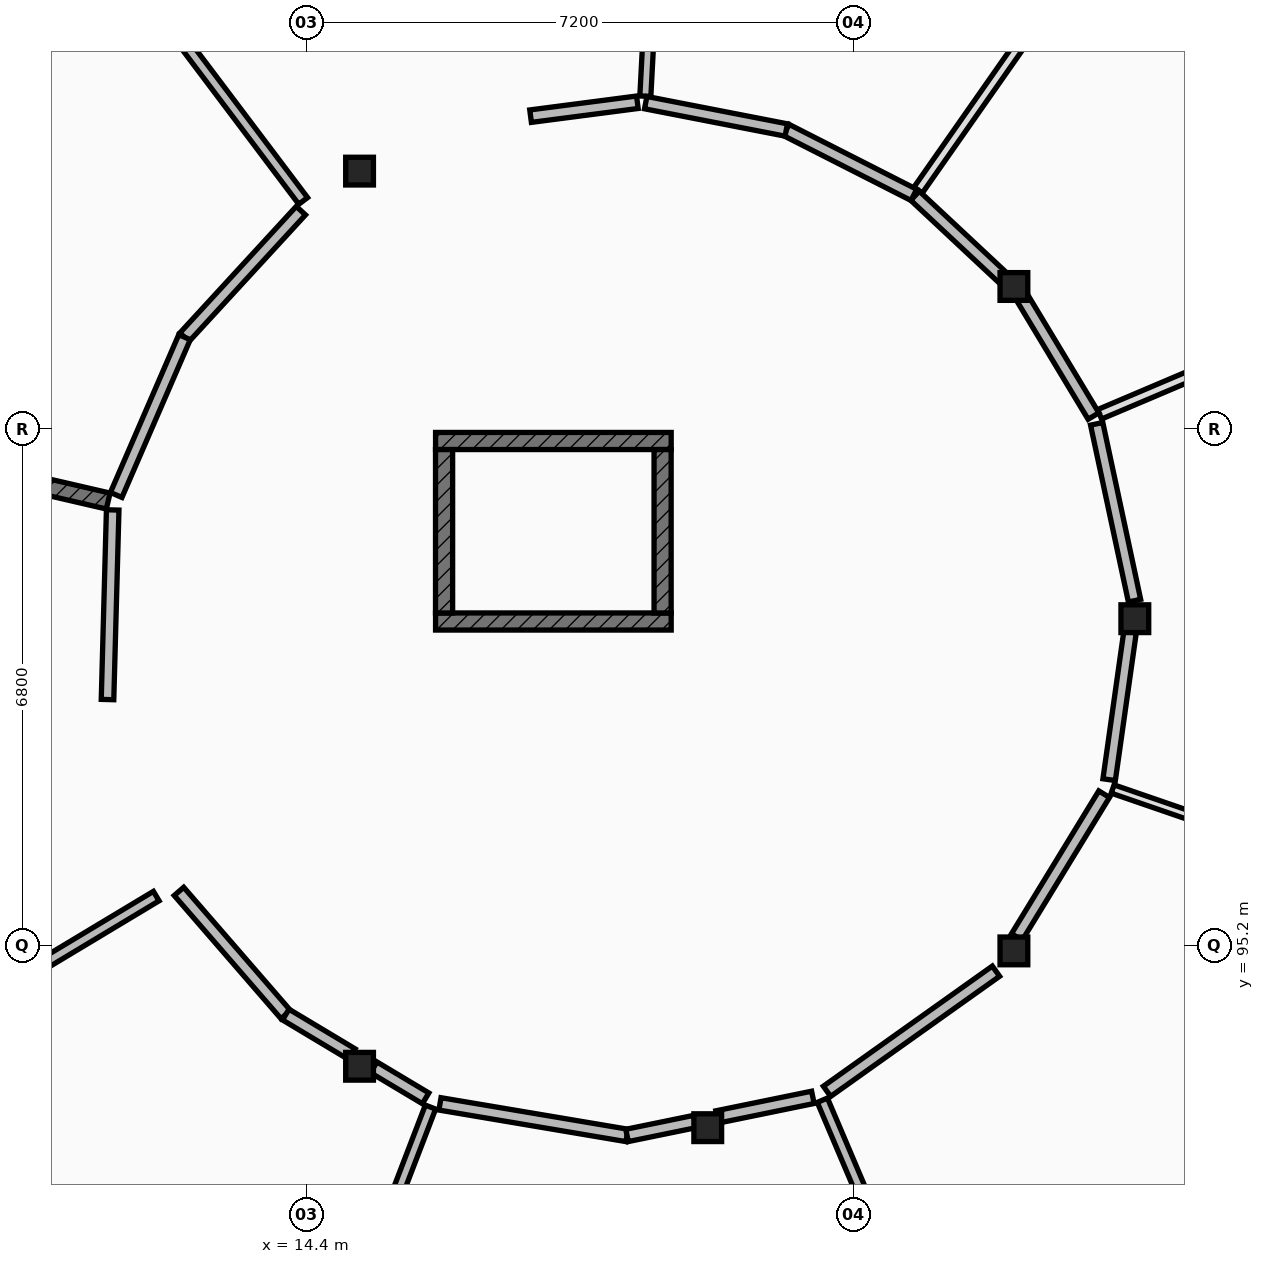
"""IFC4 building model, lengths in metres.
Left out: names, types, materials, properties, quantities, classifications, styles, units other than length and angle.
Written with IfcOpenShell. Run it as: python <this file> out.ifc"""

import sys

from ifc_helpers import new_model, si_unit, direction, frame, frame_2d, origin, origin_2d, place, context, subcontext, project, spatial, rectangle, extrude, element, fill, save


model = new_model("IFC4")
c1 = context("Model", 3, precision=1e-05, world=origin(), true_north=direction((0.0, 1.0)))
c2 = subcontext(c1, "Body", "Model", "MODEL_VIEW")
j1 = project(units=[si_unit("LENGTHUNIT", "METRE"), si_unit("PLANEANGLEUNIT", "RADIAN")], contexts=[c1])
p1 = place(None, origin())
s1 = spatial("IfcSite", under=j1, at=p1, CompositionType="ELEMENT")
p2 = place(p1, origin())
s2 = spatial("IfcBuilding", under=s1, at=p2, CompositionType="ELEMENT")
p3 = place(p2, frame((0.0, 0.0, 8.75)))
s3 = spatial("IfcBuildingStorey", under=s2, at=p3, CompositionType="ELEMENT", Elevation=8.75)
for number, where, z_axis, x_axis in (
    (1, (25.3, 99.5, 0.0), (0.0, 0.0, 1.0), (1.0, 0.0, 0.0)),
    (2, (23.709, 103.871, 0.0), (0.0, 0.0, 1.0), (1.0, 0.0, 0.0)),
    (3, (15.1, 105.389, 0.0), (0.0, 0.0, 1.0), (1.0, 0.0, 0.0)),
    (4, (15.1, 93.611, 0.0), (0.0, 0.0, 1.0), (1.0, 0.0, 0.0)),
    (5, (19.681, 92.803, 0.0), (0.0, 0.0, 1.0), (1.0, 0.0, 0.0)),
    (6, (23.709, 95.129, 0.0), (0.0, 0.0, 1.0), (1.0, 0.0, 0.0)),
):
    element("IfcColumn", number, at=place(p3, frame(where, z_axis=z_axis, x_axis=x_axis)), inside=s3, PredefinedType="COLUMN", context=c2, shape_type="SweptSolid", body=[
        extrude(rectangle(XDim=0.365, YDim=0.365, at=origin_2d()), origin(), (0.0, 0.0, 1.0), 4.2),
    ])
p4 = place(p3, frame((16.1, 99.463, 0.0), z_axis=(0.0, 0.0, 1.0), x_axis=(1.0, 0.0, 0.0)))
e7 = element("IfcWall", 7, at=p4, inside=s3, PredefinedType="SHEAR", context=c2, shape_type="SweptSolid", body=[
    extrude(rectangle(XDim=3.1, YDim=0.225, at=frame_2d((1.55, 0.0))), origin(), (0.0, 0.0, 1.0), 3.975),
])
p5 = place(p4, frame((0.95, 0.0, 0.0)))
e8 = element("IfcOpeningElement", 8, at=p5, cuts=e7, PredefinedType="OPENING", context=c2, shape_type="SweptSolid", body=[
    extrude(rectangle(XDim=1.2, YDim=2.2, at=frame_2d((0.6, 1.1))), frame((0.0, 0.123, 0.0), z_axis=(0.0, -1.0, 0.0), x_axis=(1.0, 0.0, 0.0)), (0.0, 0.0, 1.0), 0.245),
])
p6 = place(p3, frame((16.1, 101.838, 0.0), z_axis=(0.0, 0.0, 1.0), x_axis=(1.0, 0.0, 0.0)))
e9 = element("IfcWall", 9, at=p6, inside=s3, PredefinedType="SHEAR", context=c2, shape_type="SweptSolid", body=[
    extrude(rectangle(XDim=3.1, YDim=0.225, at=frame_2d((1.55, 0.0))), origin(), (0.0, 0.0, 1.0), 3.975),
])
for number, where, z_axis, x_axis in (
    (10, (16.212, 99.575, 0.0), (0.0, 0.0, 1.0), (0.0, 1.0, 0.0)),
    (11, (19.087, 99.575, 0.0), (0.0, 0.0, 1.0), (0.0, 1.0, 0.0)),
):
    element("IfcWall", number, at=place(p3, frame(where, z_axis=z_axis, x_axis=x_axis)), inside=s3, PredefinedType="SHEAR", context=c2, shape_type="SweptSolid", body=[
        extrude(rectangle(XDim=2.15, YDim=0.225, at=frame_2d((1.075, 0.0))), origin(), (0.0, 0.0, 1.0), 3.975),
    ])
p7 = place(p3, frame((18.86, 106.374, 0.0), z_axis=(0.0, 0.0, 1.0), x_axis=(0.052244629109, 0.998634316819, 0.0)))
e12 = element("IfcWall", 12, at=p7, inside=s3, PredefinedType="PARTITIONING", context=c2, shape_type="SweptSolid", body=[
    extrude(rectangle(XDim=0.897, YDim=0.145, at=frame_2d((0.449, 0.0))), origin(), (0.0, 0.0, 1.0), 3.304),
])
p8 = place(p3, frame((14.358, 104.997, 0.0), z_axis=(0.0, 0.0, 1.0), x_axis=(-0.601846782462, 0.798611576701, 0.0)))
e13 = element("IfcWall", 13, at=p8, inside=s3, PredefinedType="PARTITIONING", context=c2, shape_type="SweptSolid", body=[
    extrude(rectangle(XDim=5.875, YDim=0.145, at=frame_2d((2.938, 0.0))), origin(), (0.0, 0.0, 1.0), 3.304),
])
p9 = place(p3, frame((11.793, 101.048, 0.0), z_axis=(0.0, 0.0, 1.0), x_axis=(-0.974281711151, 0.225333413672, 0.0)))
e14 = element("IfcWall", 14, at=p9, inside=s3, PredefinedType="SOLIDWALL", context=c2, shape_type="SweptSolid", body=[
    extrude(rectangle(XDim=1.091, YDim=0.215, at=frame_2d((0.545, 0.0))), origin(), (0.0, 0.0, 1.0), 3.304),
])
p10 = place(p3, frame((12.425, 95.85, 0.0), z_axis=(0.0, 0.0, 1.0), x_axis=(-0.857148493381, -0.515069374255, 0.0)))
e15 = element("IfcWall", 15, at=p10, inside=s3, PredefinedType="PARTITIONING", context=c2, shape_type="SweptSolid", body=[
    extrude(rectangle(XDim=5.695, YDim=0.145, at=frame_2d((2.847, 0.0))), origin(), (0.0, 0.0, 1.0), 3.304),
])
p11 = place(p3, frame((16.033, 93.074, 0.0), z_axis=(0.0, 0.0, 1.0), x_axis=(-0.35829933208, -0.933606763381, 0.0)))
e16 = element("IfcWall", 16, at=p11, inside=s3, PredefinedType="PARTITIONING", context=c2, shape_type="SweptSolid", body=[
    extrude(rectangle(XDim=5.897, YDim=0.145, at=frame_2d((2.949, 0.0))), origin(), (0.0, 0.0, 1.0), 3.304),
])
p12 = place(p3, frame((21.189, 93.164, 0.0), z_axis=(0.0, 0.0, 1.0), x_axis=(0.390817685438, -0.920468107404, 0.0)))
e17 = element("IfcWall", 17, at=p12, inside=s3, PredefinedType="PARTITIONING", context=c2, shape_type="SweptSolid", body=[
    extrude(rectangle(XDim=5.875, YDim=0.145, at=frame_2d((2.938, 0.0))), origin(), (0.0, 0.0, 1.0), 3.304),
])
p13 = place(p3, frame((25.008, 97.259, 0.0), z_axis=(0.0, 0.0, 1.0), x_axis=(0.945537377012, -0.325513546068, 0.0)))
e18 = element("IfcWall", 18, at=p13, inside=s3, PredefinedType="PARTITIONING", context=c2, shape_type="SweptSolid", body=[
    extrude(rectangle(XDim=5.898, YDim=0.115, at=frame_2d((2.949, 0.0))), origin(), (0.0, 0.0, 1.0), 3.304),
])
p14 = place(p3, frame((24.836, 102.189, 0.0), z_axis=(0.0, 0.0, 1.0), x_axis=(0.920468107404, 0.390817685438, 0.0)))
e19 = element("IfcWall", 19, at=p14, inside=s3, PredefinedType="PLUMBINGWALL", context=c2, shape_type="SweptSolid", body=[
    extrude(rectangle(XDim=5.875, YDim=0.135, at=frame_2d((2.938, 0.0))), origin(), (0.0, 0.0, 1.0), 3.304),
])
p15 = place(p3, frame((22.448, 105.138, 0.0), z_axis=(0.0, 0.0, 1.0), x_axis=(0.573462344363, 0.819231920519, 0.0)))
e20 = element("IfcWall", 20, at=p15, inside=s3, PredefinedType="PLUMBINGWALL", context=c2, shape_type="SweptSolid", body=[
    extrude(rectangle(XDim=5.868, YDim=0.135, at=frame_2d((2.934, 0.0))), origin(), (0.0, 0.0, 1.0), 3.304),
])
p16 = place(p3, frame((18.755, 106.295, 0.0), z_axis=(0.0, 0.0, 1.0), x_axis=(-0.991634012436, -0.129081313054, 0.0)))
e21 = element("IfcWall", 21, at=p16, inside=s3, PredefinedType="PARTITIONING", context=c2, shape_type="SweptSolid", body=[
    extrude(rectangle(XDim=1.417, YDim=0.165, at=frame_2d((0.708, 0.0))), origin(), (0.0, 0.0, 1.0), 3.304),
])
p17 = place(p16, frame((0.258, 0.0, 0.0)))
e22 = element("IfcOpeningElement", 22, at=p17, cuts=e21, PredefinedType="OPENING", context=c2, shape_type="SweptSolid", body=[
    extrude(rectangle(XDim=0.9, YDim=2.1, at=frame_2d((0.45, 1.05))), frame((0.0, 0.093, 0.0), z_axis=(0.0, -1.0, 0.0), x_axis=(1.0, 0.0, 0.0)), (0.0, 0.0, 1.0), 0.185),
])
p18 = place(p3, frame((14.328, 104.869, 0.0), z_axis=(0.0, 0.0, 1.0), x_axis=(-0.676853044356, -0.736118167379, 0.0)))
e23 = element("IfcWall", 23, at=p18, inside=s3, PredefinedType="PARTITIONING", context=c2, shape_type="SweptSolid", body=[
    extrude(rectangle(XDim=2.261, YDim=0.165, at=frame_2d((1.131, 0.0))), origin(), (0.0, 0.0, 1.0), 3.304),
])
p19 = place(p18, frame((0.566, 0.0, 0.0)))
e24 = element("IfcOpeningElement", 24, at=p19, cuts=e23, PredefinedType="OPENING", context=c2, shape_type="SweptSolid", body=[
    extrude(rectangle(XDim=1.13, YDim=2.14, at=frame_2d((0.565, 1.07))), frame((0.0, 0.093, 0.0), z_axis=(0.0, -1.0, 0.0), x_axis=(1.0, 0.0, 0.0)), (0.0, 0.0, 1.0), 0.185),
])
p20 = place(p3, frame((12.797, 103.204, 0.0), z_axis=(0.0, 0.0, 1.0), x_axis=(-0.397419678039, -0.917636964985, 0.0)))
e25 = element("IfcWall", 25, at=p20, inside=s3, PredefinedType="PARTITIONING", context=c2, shape_type="SweptSolid", body=[
    extrude(rectangle(XDim=2.262, YDim=0.165, at=frame_2d((1.131, 0.0))), origin(), (0.0, 0.0, 1.0), 3.304),
])
p21 = place(p3, frame((11.852, 100.931, 0.0), z_axis=(0.0, 0.0, 1.0), x_axis=(-0.027291914499, -0.999627506326, 0.0)))
e26 = element("IfcWall", 26, at=p21, inside=s3, PredefinedType="PARTITIONING", context=c2, shape_type="SweptSolid", body=[
    extrude(rectangle(XDim=2.496, YDim=0.165, at=frame_2d((1.248, 0.0))), origin(), (0.0, 0.0, 1.0), 3.304),
])
p22 = place(p21, frame((0.523, 0.0, 0.0)))
e27 = element("IfcOpeningElement", 27, at=p22, cuts=e26, PredefinedType="OPENING", context=c2, shape_type="SweptSolid", body=[
    extrude(rectangle(XDim=1.45, YDim=2.28, at=frame_2d((0.725, 1.14))), frame((0.0, 0.093, 0.0), z_axis=(0.0, -1.0, 0.0), x_axis=(1.0, 0.0, 0.0)), (0.0, 0.0, 1.0), 0.185),
])
p23 = place(p3, frame((12.724, 95.912, 0.0), z_axis=(0.0, 0.0, 1.0), x_axis=(0.654887207042, -0.755726634473, 0.0)))
e28 = element("IfcWall", 28, at=p23, inside=s3, PredefinedType="PARTITIONING", context=c2, shape_type="SweptSolid", body=[
    extrude(rectangle(XDim=2.145, YDim=0.165, at=frame_2d((1.073, 0.0))), origin(), (0.0, 0.0, 1.0), 3.304),
])
p24 = place(p23, frame((0.488, 0.0, 0.0)))
e29 = element("IfcOpeningElement", 29, at=p24, cuts=e28, PredefinedType="OPENING", context=c2, shape_type="SweptSolid", body=[
    extrude(rectangle(XDim=1.17, YDim=2.24, at=frame_2d((0.585, 1.12))), frame((0.0, 0.093, 0.0), z_axis=(0.0, -1.0, 0.0), x_axis=(1.0, 0.0, 0.0)), (0.0, 0.0, 1.0), 0.185),
])
p25 = place(p3, frame((14.129, 94.291, 0.0), z_axis=(0.0, 0.0, 1.0), x_axis=(0.857789762301, -0.51400070398, 0.0)))
e30 = element("IfcWall", 30, at=p25, inside=s3, PredefinedType="PARTITIONING", context=c2, shape_type="SweptSolid", body=[
    extrude(rectangle(XDim=1.016, YDim=0.165, at=frame_2d((0.508, 0.0))), origin(), (0.0, 0.0, 1.0), 3.304),
])
p26 = place(p3, frame((15.287, 93.597, 0.0), z_axis=(0.0, 0.0, 1.0), x_axis=(0.858142882263, -0.513410940301, 0.0)))
e31 = element("IfcWall", 31, at=p26, inside=s3, PredefinedType="PARTITIONING", context=c2, shape_type="SweptSolid", body=[
    extrude(rectangle(XDim=0.795, YDim=0.165, at=frame_2d((0.397, 0.0))), origin(), (0.0, 0.0, 1.0), 3.304),
])
p27 = place(p3, frame((16.158, 93.116, 0.0), z_axis=(0.0, 0.0, 1.0), x_axis=(0.986074817065, -0.166302300497, 0.0)))
e32 = element("IfcWall", 32, at=p27, inside=s3, PredefinedType="PARTITIONING", context=c2, shape_type="SweptSolid", body=[
    extrude(rectangle(XDim=2.496, YDim=0.165, at=frame_2d((1.248, 0.0))), origin(), (0.0, 0.0, 1.0), 3.304),
])
p28 = place(p27, frame((0.653, 0.0, 0.0)))
e33 = element("IfcOpeningElement", 33, at=p28, cuts=e32, PredefinedType="OPENING", context=c2, shape_type="SweptSolid", body=[
    extrude(rectangle(XDim=1.19, YDim=2.26, at=frame_2d((0.595, 1.13))), frame((0.0, 0.093, 0.0), z_axis=(0.0, -1.0, 0.0), x_axis=(1.0, 0.0, 0.0)), (0.0, 0.0, 1.0), 0.185),
])
p29 = place(p3, frame((18.619, 92.701, 0.0), z_axis=(0.0, 0.0, 1.0), x_axis=(0.979621619883, 0.200851890353, 0.0)))
e34 = element("IfcWall", 34, at=p29, inside=s3, PredefinedType="PARTITIONING", context=c2, shape_type="SweptSolid", body=[
    extrude(rectangle(XDim=0.912, YDim=0.165, at=frame_2d((0.456, 0.0))), origin(), (0.0, 0.0, 1.0), 3.304),
])
p30 = place(p3, frame((19.804, 92.944, 0.0), z_axis=(0.0, 0.0, 1.0), x_axis=(0.97970222492, 0.200458351001, 0.0)))
e35 = element("IfcWall", 35, at=p30, inside=s3, PredefinedType="PARTITIONING", context=c2, shape_type="SweptSolid", body=[
    extrude(rectangle(XDim=1.286, YDim=0.165, at=frame_2d((0.643, 0.0))), origin(), (0.0, 0.0, 1.0), 3.304),
])
p31 = place(p3, frame((21.25, 93.281, 0.0), z_axis=(0.0, 0.0, 1.0), x_axis=(0.814898961152, 0.579603039255, 0.0)))
e36 = element("IfcWall", 36, at=p31, inside=s3, PredefinedType="PARTITIONING", context=c2, shape_type="SweptSolid", body=[
    extrude(rectangle(XDim=2.728, YDim=0.165, at=frame_2d((1.364, 0.0))), origin(), (0.0, 0.0, 1.0), 3.304),
])
p32 = place(p31, frame((0.759, 0.0, 0.0)))
e37 = element("IfcOpeningElement", 37, at=p32, cuts=e36, PredefinedType="OPENING", context=c2, shape_type="SweptSolid", body=[
    extrude(rectangle(XDim=1.21, YDim=2.16, at=frame_2d((0.605, 1.08))), frame((0.0, 0.093, 0.0), z_axis=(0.0, -1.0, 0.0), x_axis=(1.0, 0.0, 0.0)), (0.0, 0.0, 1.0), 0.185),
])
p33 = place(p3, frame((23.748, 95.312, 0.0), z_axis=(0.0, 0.0, 1.0), x_axis=(0.521360305461, 0.853336646283, 0.0)))
e38 = element("IfcWall", 38, at=p33, inside=s3, PredefinedType="PARTITIONING", context=c2, shape_type="SweptSolid", body=[
    extrude(rectangle(XDim=2.202, YDim=0.165, at=frame_2d((1.101, 0.0))), origin(), (0.0, 0.0, 1.0), 3.304),
])
p34 = place(p3, frame((24.962, 97.382, 0.0), z_axis=(0.0, 0.0, 1.0), x_axis=(0.140288499372, 0.990110669039, 0.0)))
e39 = element("IfcWall", 39, at=p34, inside=s3, PredefinedType="PARTITIONING", context=c2, shape_type="SweptSolid", body=[
    extrude(rectangle(XDim=1.961, YDim=0.165, at=frame_2d((0.98, 0.0))), origin(), (0.0, 0.0, 1.0), 3.304),
])
p35 = place(p34, frame((0.541, 0.0, 0.0)))
e40 = element("IfcOpeningElement", 40, at=p35, cuts=e39, PredefinedType="OPENING", context=c2, shape_type="SweptSolid", body=[
    extrude(rectangle(XDim=0.88, YDim=2.1, at=frame_2d((0.44, 1.05))), frame((0.0, 0.093, 0.0), z_axis=(0.0, -1.0, 0.0), x_axis=(1.0, 0.0, 0.0)), (0.0, 0.0, 1.0), 0.185),
])
p36 = place(p3, frame((25.296, 99.737, 0.0), z_axis=(0.0, 0.0, 1.0), x_axis=(-0.209199758456, 0.977872926848, 0.0)))
e41 = element("IfcWall", 41, at=p36, inside=s3, PredefinedType="PARTITIONING", context=c2, shape_type="SweptSolid", body=[
    extrude(rectangle(XDim=2.38, YDim=0.165, at=frame_2d((1.19, 0.0))), origin(), (0.0, 0.0, 1.0), 3.304),
])
p37 = place(p3, frame((24.756, 102.166, 0.0), z_axis=(0.0, 0.0, 1.0), x_axis=(-0.515979321691, 0.85660103875, 0.0)))
e42 = element("IfcWall", 42, at=p37, inside=s3, PredefinedType="PARTITIONING", context=c2, shape_type="SweptSolid", body=[
    extrude(rectangle(XDim=1.814, YDim=0.165, at=frame_2d((0.907, 0.0))), origin(), (0.0, 0.0, 1.0), 3.304),
])
p38 = place(p37, frame((0.437, 0.0, 0.0)))
e43 = element("IfcOpeningElement", 43, at=p38, cuts=e42, PredefinedType="OPENING", context=c2, shape_type="SweptSolid", body=[
    extrude(rectangle(XDim=0.94, YDim=2.1, at=frame_2d((0.47, 1.05))), frame((0.0, 0.093, 0.0), z_axis=(0.0, -1.0, 0.0), x_axis=(1.0, 0.0, 0.0)), (0.0, 0.0, 1.0), 0.185),
])
p39 = place(p3, frame((23.562, 103.987, 0.0), z_axis=(0.0, 0.0, 1.0), x_axis=(-0.730813584636, 0.682577105176, 0.0)))
e44 = element("IfcWall", 44, at=p39, inside=s3, PredefinedType="PARTITIONING", context=c2, shape_type="SweptSolid", body=[
    extrude(rectangle(XDim=1.579, YDim=0.165, at=frame_2d((0.79, 0.0))), origin(), (0.0, 0.0, 1.0), 3.304),
])
p40 = place(p3, frame((22.393, 105.076, 0.0), z_axis=(0.0, 0.0, 1.0), x_axis=(-0.891321219161, 0.453372346172, 0.0)))
e45 = element("IfcWall", 45, at=p40, inside=s3, PredefinedType="PARTITIONING", context=c2, shape_type="SweptSolid", body=[
    extrude(rectangle(XDim=1.884, YDim=0.165, at=frame_2d((0.942, 0.0))), origin(), (0.0, 0.0, 1.0), 3.304),
])
p41 = place(p40, frame((0.452, 0.0, 0.0)))
e46 = element("IfcOpeningElement", 46, at=p41, cuts=e45, PredefinedType="OPENING", context=c2, shape_type="SweptSolid", body=[
    extrude(rectangle(XDim=0.98, YDim=2.1, at=frame_2d((0.49, 1.05))), frame((0.0, 0.093, 0.0), z_axis=(0.0, -1.0, 0.0), x_axis=(1.0, 0.0, 0.0)), (0.0, 0.0, 1.0), 0.185),
])
p42 = place(p3, frame((20.714, 105.93, 0.0), z_axis=(0.0, 0.0, 1.0), x_axis=(-0.981560041322, 0.191154087794, 0.0)))
e47 = element("IfcWall", 47, at=p42, inside=s3, PredefinedType="PARTITIONING", context=c2, shape_type="SweptSolid", body=[
    extrude(rectangle(XDim=1.884, YDim=0.165, at=frame_2d((0.942, 0.0))), origin(), (0.0, 0.0, 1.0), 3.304),
])
p43 = place(p5, origin())
e48 = element("IfcDoor", 48, at=p43, inside=s3, OperationType="DOUBLE_DOOR_SLIDING", PredefinedType="DOOR", context=c2, shape_type="SweptSolid", body=[
    extrude(rectangle(XDim=1.2, YDim=2.2, at=frame_2d((0.6, 1.1))), frame((0.0, 0.025, 0.0), z_axis=(0.0, -1.0, 0.0), x_axis=(1.0, 0.0, 0.0)), (0.0, 0.0, 1.0), 0.05),
])
fill(e8, e48)
p44 = place(p17, origin())
e49 = element("IfcDoor", 49, at=p44, inside=s3, OperationType="SINGLE_SWING_RIGHT", PredefinedType="DOOR", context=c2, shape_type="SweptSolid", body=[
    extrude(rectangle(XDim=0.9, YDim=2.1, at=frame_2d((0.45, 1.05))), frame((0.0, 0.025, 0.0), z_axis=(0.0, -1.0, 0.0), x_axis=(1.0, 0.0, 0.0)), (0.0, 0.0, 1.0), 0.05),
])
fill(e22, e49)
p45 = place(p19, origin())
e50 = element("IfcDoor", 50, at=p45, inside=s3, OperationType="SINGLE_SWING_LEFT", PredefinedType="DOOR", context=c2, shape_type="SweptSolid", body=[
    extrude(rectangle(XDim=1.13, YDim=2.14, at=frame_2d((0.565, 1.07))), frame((0.0, 0.025, 0.0), z_axis=(0.0, -1.0, 0.0), x_axis=(1.0, 0.0, 0.0)), (0.0, 0.0, 1.0), 0.05),
])
fill(e24, e50)
p46 = place(p22, origin())
e51 = element("IfcDoor", 51, at=p46, inside=s3, OperationType="SINGLE_SWING_RIGHT", PredefinedType="DOOR", context=c2, shape_type="SweptSolid", body=[
    extrude(rectangle(XDim=1.45, YDim=2.28, at=frame_2d((0.725, 1.14))), frame((0.0, 0.025, 0.0), z_axis=(0.0, -1.0, 0.0), x_axis=(1.0, 0.0, 0.0)), (0.0, 0.0, 1.0), 0.05),
])
fill(e27, e51)
p47 = place(p24, origin())
e52 = element("IfcDoor", 52, at=p47, inside=s3, OperationType="SINGLE_SWING_LEFT", PredefinedType="DOOR", context=c2, shape_type="SweptSolid", body=[
    extrude(rectangle(XDim=1.17, YDim=2.24, at=frame_2d((0.585, 1.12))), frame((0.0, 0.025, 0.0), z_axis=(0.0, -1.0, 0.0), x_axis=(1.0, 0.0, 0.0)), (0.0, 0.0, 1.0), 0.05),
])
fill(e29, e52)
p48 = place(p28, origin())
e53 = element("IfcDoor", 53, at=p48, inside=s3, OperationType="SINGLE_SWING_RIGHT", PredefinedType="DOOR", context=c2, shape_type="SweptSolid", body=[
    extrude(rectangle(XDim=1.19, YDim=2.26, at=frame_2d((0.595, 1.13))), frame((0.0, 0.025, 0.0), z_axis=(0.0, -1.0, 0.0), x_axis=(1.0, 0.0, 0.0)), (0.0, 0.0, 1.0), 0.05),
])
fill(e33, e53)
p49 = place(p32, origin())
e54 = element("IfcDoor", 54, at=p49, inside=s3, OperationType="SINGLE_SWING_LEFT", PredefinedType="DOOR", context=c2, shape_type="SweptSolid", body=[
    extrude(rectangle(XDim=1.21, YDim=2.16, at=frame_2d((0.605, 1.08))), frame((0.0, 0.025, 0.0), z_axis=(0.0, -1.0, 0.0), x_axis=(1.0, 0.0, 0.0)), (0.0, 0.0, 1.0), 0.05),
])
fill(e37, e54)
p50 = place(p35, origin())
e55 = element("IfcDoor", 55, at=p50, inside=s3, OperationType="SINGLE_SWING_RIGHT", PredefinedType="DOOR", context=c2, shape_type="SweptSolid", body=[
    extrude(rectangle(XDim=0.88, YDim=2.1, at=frame_2d((0.44, 1.05))), frame((0.0, 0.025, 0.0), z_axis=(0.0, -1.0, 0.0), x_axis=(1.0, 0.0, 0.0)), (0.0, 0.0, 1.0), 0.05),
])
fill(e40, e55)
p51 = place(p38, origin())
e56 = element("IfcDoor", 56, at=p51, inside=s3, OperationType="SINGLE_SWING_LEFT", PredefinedType="DOOR", context=c2, shape_type="SweptSolid", body=[
    extrude(rectangle(XDim=0.94, YDim=2.1, at=frame_2d((0.47, 1.05))), frame((0.0, 0.025, 0.0), z_axis=(0.0, -1.0, 0.0), x_axis=(1.0, 0.0, 0.0)), (0.0, 0.0, 1.0), 0.05),
])
fill(e43, e56)
p52 = place(p41, origin())
e57 = element("IfcDoor", 57, at=p52, inside=s3, OperationType="SINGLE_SWING_RIGHT", PredefinedType="DOOR", context=c2, shape_type="SweptSolid", body=[
    extrude(rectangle(XDim=0.98, YDim=2.1, at=frame_2d((0.49, 1.05))), frame((0.0, 0.025, 0.0), z_axis=(0.0, -1.0, 0.0), x_axis=(1.0, 0.0, 0.0)), (0.0, 0.0, 1.0), 0.05),
])
fill(e46, e57)
save(model, sys.argv[1])
